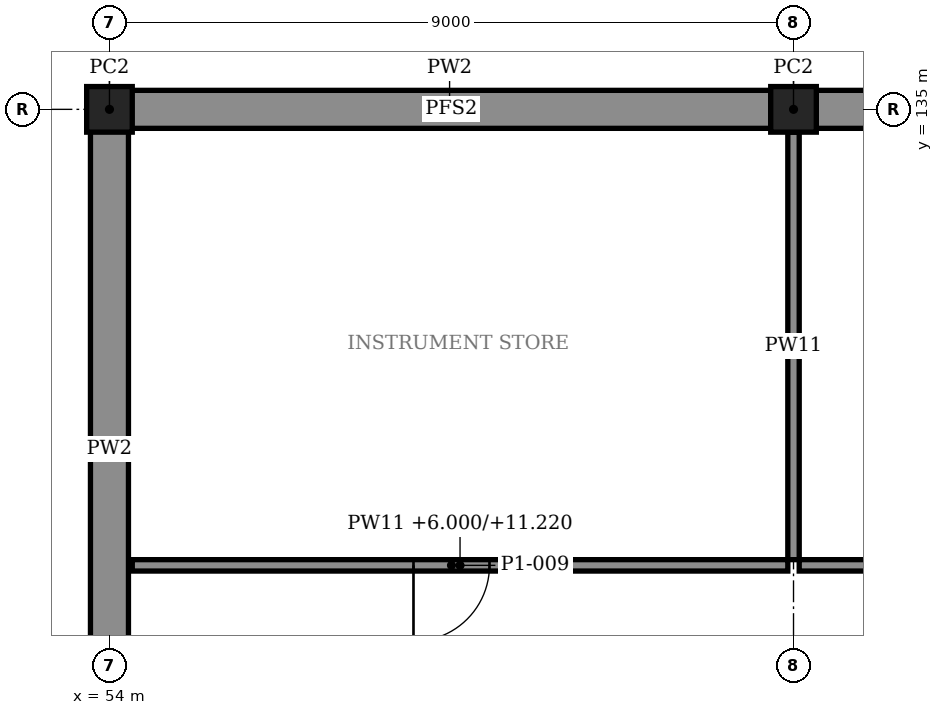
"""IFC4 building model, lengths in metres.
Left out: names, types, materials, properties, quantities, classifications, styles, units other than length and angle.
Written with IfcOpenShell. Run it as: python <this file> out.ifc"""

import sys

from ifc_helpers import new_model, si_unit, direction, frame, frame_2d, origin, origin_2d, place, context, subcontext, project, spatial, rectangle, extrude, element, fill, save


model = new_model("IFC4")
c1 = context("Model", 3, precision=1e-05, world=origin(), true_north=direction((0.0, 1.0)))
c2 = subcontext(c1, "Body", "Model", "MODEL_VIEW")
j1 = project(units=[si_unit("LENGTHUNIT", "METRE"), si_unit("PLANEANGLEUNIT", "RADIAN")], contexts=[c1])
p1 = place(None, origin())
s1 = spatial("IfcSite", under=j1, at=p1, CompositionType="ELEMENT")
p2 = place(p1, origin())
s2 = spatial("IfcBuilding", under=s1, at=p2, CompositionType="ELEMENT")
p3 = place(p2, frame((0.0, 0.0, 6.0)))
s3 = spatial("IfcBuildingStorey", under=s2, at=p3, CompositionType="ELEMENT", Elevation=6.0)
for number, where, z_axis, x_axis in (
    (1, (54.0, 135.0, 0.0), (0.0, 0.0, 1.0), (1.0, 0.0, 0.0)),
    (2, (63.0, 135.0, 0.0), (0.0, 0.0, 1.0), (1.0, 0.0, 0.0)),
):
    element("IfcColumn", number, at=place(p3, frame(where, z_axis=z_axis, x_axis=x_axis)), inside=s3, PredefinedType="COLUMN", context=c2, shape_type="SweptSolid", body=[
        extrude(rectangle(XDim=0.6, YDim=0.6, at=origin_2d()), origin(), (0.0, 0.0, 1.0), 5.5),
    ])
p4 = place(p3, frame((54.25, 135.0, 0.0), z_axis=(0.0, 0.0, 1.0), x_axis=(1.0, 0.0, 0.0)))
e3 = element("IfcWall", 3, at=p4, inside=s3, PredefinedType="SOLIDWALL", context=c2, shape_type="SweptSolid", body=[
    extrude(rectangle(XDim=8.45, YDim=0.5, at=frame_2d((4.225, 0.0))), origin(), (0.0, 0.0, 1.0), 4.32),
])
p5 = place(p3, frame((63.3, 135.0, 0.0), z_axis=(0.0, 0.0, 1.0), x_axis=(1.0, 0.0, 0.0)))
e4 = element("IfcWall", 4, at=p5, inside=s3, PredefinedType="SOLIDWALL", context=c2, shape_type="SweptSolid", body=[
    extrude(rectangle(XDim=8.3, YDim=0.5, at=frame_2d((4.15, 0.0))), origin(), (0.0, 0.0, 1.0), 4.32),
])
p6 = place(p3, frame((54.0, 126.3, 0.0), z_axis=(0.0, 0.0, 1.0), x_axis=(0.0, 1.0, 0.0)))
e5 = element("IfcWall", 5, at=p6, inside=s3, PredefinedType="SOLIDWALL", context=c2, shape_type="SweptSolid", body=[
    extrude(rectangle(XDim=8.45, YDim=0.5, at=frame_2d((4.225, 0.0))), origin(), (0.0, 0.0, 1.0), 4.32),
])
p7 = place(p3, frame((71.8, 129.0, 0.0), z_axis=(0.0, 0.0, 1.0), x_axis=(-1.0, 0.0, 0.0)))
e6 = element("IfcWall", 6, at=p7, inside=s3, PredefinedType="PARTITIONING", context=c2, shape_type="SweptSolid", body=[
    extrude(rectangle(XDim=8.725, YDim=0.15, at=frame_2d((4.363, 0.0))), origin(), (0.0, 0.0, 1.0), 5.22),
])
p8 = place(p7, frame((3.8, 0.0, 0.0)))
e7 = element("IfcOpeningElement", 7, at=p8, cuts=e6, PredefinedType="OPENING", context=c2, shape_type="SweptSolid", body=[
    extrude(rectangle(XDim=1.0, YDim=2.4, at=frame_2d((0.5, 1.2))), frame((0.0, 0.085, 0.0), z_axis=(0.0, -1.0, 0.0), x_axis=(1.0, 0.0, 0.0)), (0.0, 0.0, 1.0), 0.17),
])
p9 = place(p3, frame((62.925, 129.0, 0.0), z_axis=(0.0, 0.0, 1.0), x_axis=(-1.0, 0.0, 0.0)))
e8 = element("IfcWall", 8, at=p9, inside=s3, PredefinedType="PARTITIONING", context=c2, shape_type="SweptSolid", body=[
    extrude(rectangle(XDim=8.625, YDim=0.15, at=frame_2d((4.312, 0.0))), origin(), (0.0, 0.0, 1.0), 5.22),
])
p10 = place(p9, frame((3.925, 0.0, 0.0)))
e9 = element("IfcOpeningElement", 9, at=p10, cuts=e8, PredefinedType="OPENING", context=c2, shape_type="SweptSolid", body=[
    extrude(rectangle(XDim=1.0, YDim=2.4, at=frame_2d((0.5, 1.2))), frame((0.0, 0.085, 0.0), z_axis=(0.0, -1.0, 0.0), x_axis=(1.0, 0.0, 0.0)), (0.0, 0.0, 1.0), 0.17),
])
p11 = place(p3, frame((63.0, 129.075, 0.0), z_axis=(0.0, 0.0, 1.0), x_axis=(0.0, 1.0, 0.0)))
e10 = element("IfcWall", 10, at=p11, inside=s3, PredefinedType="PARTITIONING", context=c2, shape_type="SweptSolid", body=[
    extrude(rectangle(XDim=5.625, YDim=0.15, at=frame_2d((2.812, 0.0))), origin(), (0.0, 0.0, 1.0), 4.32),
])
p12 = place(p10, origin())
e11 = element("IfcDoor", 11, at=p12, inside=s3, OperationType="SINGLE_SWING_RIGHT", PredefinedType="DOOR", context=c2, shape_type="SweptSolid", body=[
    extrude(rectangle(XDim=1.0, YDim=2.4, at=frame_2d((0.5, 1.2))), frame((0.0, 0.025, 0.0), z_axis=(0.0, -1.0, 0.0), x_axis=(1.0, 0.0, 0.0)), (0.0, 0.0, 1.0), 0.05),
])
fill(e9, e11)
save(model, sys.argv[1])
